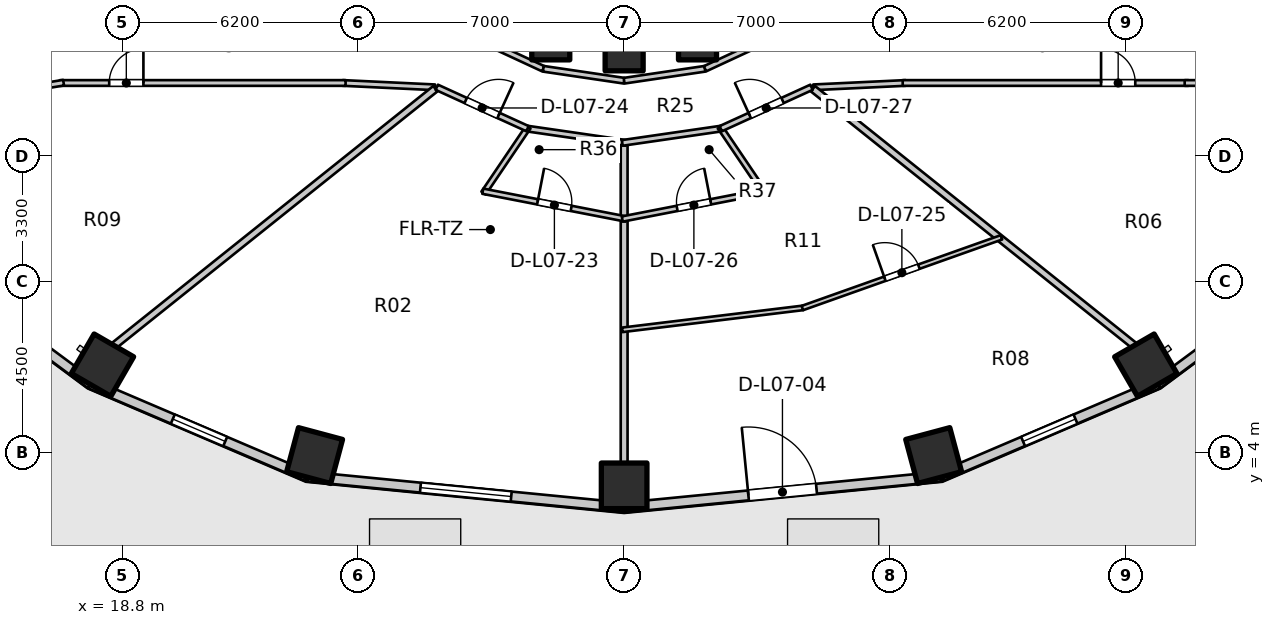
"""IFC4 building model, lengths in metres.
Left out: names, types, materials, properties, quantities, classifications, styles, units other than length and angle.
Written with IfcOpenShell. Run it as: python <this file> out.ifc"""

import sys

from ifc_helpers import new_model, si_unit, direction, frame, frame_2d, origin, origin_2d, place, context, subcontext, project, spatial, rectangle, extrude, element, fill, save


model = new_model("IFC4")
c1 = context("Model", 3, precision=1e-05, world=origin(), true_north=direction((0.0, 1.0)))
c2 = subcontext(c1, "Body", "Model", "MODEL_VIEW")
j1 = project(units=[si_unit("LENGTHUNIT", "METRE"), si_unit("PLANEANGLEUNIT", "RADIAN")], contexts=[c1])
p1 = place(None, origin())
s1 = spatial("IfcSite", under=j1, at=p1, CompositionType="ELEMENT")
p2 = place(p1, origin())
s2 = spatial("IfcBuilding", under=s1, at=p2, CompositionType="ELEMENT")
p3 = place(p2, frame((0.0, 0.0, 27.6)))
s3 = spatial("IfcBuildingStorey", under=s2, at=p3, CompositionType="ELEMENT", Elevation=27.6)
p4 = place(p3, frame((18.273, 6.296, 0.0), z_axis=(0.0, 0.0, 1.0), x_axis=(-0.5, -0.866025403784, 0.0)))
e1 = element("IfcColumn", 1, at=p4, inside=s3, PredefinedType="COLUMN", context=c2, shape_type="SweptSolid", body=[
    extrude(rectangle(XDim=1.2, YDim=1.2, at=origin_2d()), origin(), (0.0, 0.0, 1.0), 3.1),
])
p5 = place(p3, frame((30.069, 14.828, 0.0), z_axis=(0.0, 0.0, 1.0), x_axis=(1.0, 0.0, 0.0)))
e2 = element("IfcColumn", 2, at=p5, inside=s3, PredefinedType="COLUMN", context=c2, shape_type="SweptSolid", body=[
    extrude(rectangle(XDim=1.0, YDim=1.0, at=origin_2d()), origin(), (0.0, 0.0, 1.0), 3.1),
])
p6 = place(p3, frame((23.855, 3.916, 0.0), z_axis=(0.0, 0.0, 1.0), x_axis=(-0.258819045103, -0.965925826289, 0.0)))
e3 = element("IfcColumn", 3, at=p6, inside=s3, PredefinedType="COLUMN", context=c2, shape_type="SweptSolid", body=[
    extrude(rectangle(XDim=1.2, YDim=1.2, at=origin_2d()), origin(), (0.0, 0.0, 1.0), 3.1),
])
p7 = place(p3, frame((32.0, 14.54, 0.0), z_axis=(0.0, 0.0, 1.0), x_axis=(1.0, 0.0, 0.0)))
e4 = element("IfcColumn", 4, at=p7, inside=s3, PredefinedType="COLUMN", context=c2, shape_type="SweptSolid", body=[
    extrude(rectangle(XDim=1.0, YDim=1.0, at=origin_2d()), origin(), (0.0, 0.0, 1.0), 3.1),
])
p8 = place(p3, frame((32.0, 3.12, 0.0), z_axis=(0.0, 0.0, 1.0), x_axis=(0.0, -1.0, 0.0)))
e5 = element("IfcColumn", 5, at=p8, inside=s3, PredefinedType="COLUMN", context=c2, shape_type="SweptSolid", body=[
    extrude(rectangle(XDim=1.2, YDim=1.2, at=origin_2d()), origin(), (0.0, 0.0, 1.0), 3.1),
])
p9 = place(p3, frame((33.931, 14.828, 0.0), z_axis=(0.0, 0.0, 1.0), x_axis=(1.0, 0.0, 0.0)))
e6 = element("IfcColumn", 6, at=p9, inside=s3, PredefinedType="COLUMN", context=c2, shape_type="SweptSolid", body=[
    extrude(rectangle(XDim=1.0, YDim=1.0, at=origin_2d()), origin(), (0.0, 0.0, 1.0), 3.1),
])
for number, where, z_axis, x_axis in (
    (7, (40.145, 3.916, 0.0), (0.0, 0.0, 1.0), (0.259, -0.966, 0.0)),
    (8, (45.727, 6.296, 0.0), (0.0, 0.0, 1.0), (0.5, -0.866, 0.0)),
):
    element("IfcColumn", number, at=place(p3, frame(where, z_axis=z_axis, x_axis=x_axis)), inside=s3, PredefinedType="COLUMN", context=c2, shape_type="SweptSolid", body=[
        extrude(rectangle(XDim=1.2, YDim=1.2, at=origin_2d()), origin(), (0.0, 0.0, 1.0), 3.1),
    ])
p10 = place(p3, frame((13.595, 9.035, 0.0), z_axis=(0.0, 0.0, 1.0), x_axis=(0.803477531792, -0.595335078679, 0.0)))
e9 = element("IfcWall", 9, at=p10, inside=s3, PredefinedType="STANDARD", context=c2, shape_type="SweptSolid", body=[
    extrude(rectangle(XDim=5.43, YDim=0.26, at=frame_2d((2.715, 0.0))), origin(), (0.0, 0.0, 1.0), 2.85),
])
p11 = place(p3, frame((17.958, 5.803, 0.0), z_axis=(0.0, 0.0, 1.0), x_axis=(0.919612132394, -0.39282760335, 0.0)))
e10 = element("IfcWall", 10, at=p11, inside=s3, PredefinedType="STANDARD", context=c2, shape_type="SweptSolid", body=[
    extrude(rectangle(XDim=6.209, YDim=0.26, at=frame_2d((3.105, 0.0))), origin(), (0.0, 0.0, 1.0), 2.85),
])
p12 = place(p11, frame((2.355, 0.0, 0.75)))
e11 = element("IfcOpeningElement", 11, at=p12, cuts=e10, PredefinedType="OPENING", context=c2, shape_type="SweptSolid", body=[
    extrude(rectangle(XDim=1.5, YDim=1.6, at=frame_2d((0.75, 0.8))), frame((0.0, 0.14, 0.0), z_axis=(0.0, -1.0, 0.0), x_axis=(1.0, 0.0, 0.0)), (0.0, 0.0, 1.0), 0.28),
])
p13 = place(p3, frame((23.668, 3.364, 0.0), z_axis=(0.0, 0.0, 1.0), x_axis=(0.995247718352, -0.097375454379, 0.0)))
e12 = element("IfcWall", 12, at=p13, inside=s3, PredefinedType="STANDARD", context=c2, shape_type="SweptSolid", body=[
    extrude(rectangle(XDim=8.372, YDim=0.26, at=frame_2d((4.186, 0.0))), origin(), (0.0, 0.0, 1.0), 2.85),
])
p14 = place(p13, frame((2.986, 0.0, 0.75)))
e13 = element("IfcOpeningElement", 13, at=p14, cuts=e12, PredefinedType="OPENING", context=c2, shape_type="SweptSolid", body=[
    extrude(rectangle(XDim=2.4, YDim=1.7, at=frame_2d((1.2, 0.85))), frame((0.0, 0.14, 0.0), z_axis=(0.0, -1.0, 0.0), x_axis=(1.0, 0.0, 0.0)), (0.0, 0.0, 1.0), 0.28),
])
p15 = place(p3, frame((32.0, 2.549, 0.0), z_axis=(0.0, 0.0, 1.0), x_axis=(0.995247718352, 0.097375454379, 0.0)))
e14 = element("IfcWall", 14, at=p15, inside=s3, PredefinedType="STANDARD", context=c2, shape_type="SweptSolid", body=[
    extrude(rectangle(XDim=8.372, YDim=0.26, at=frame_2d((4.186, 0.0))), origin(), (0.0, 0.0, 1.0), 2.88),
])
p16 = place(p15, frame((3.286, 0.0, 0.0)))
e15 = element("IfcOpeningElement", 15, at=p16, cuts=e14, PredefinedType="OPENING", context=c2, shape_type="SweptSolid", body=[
    extrude(rectangle(XDim=1.8, YDim=2.35, at=frame_2d((0.9, 1.175))), frame((0.0, 0.14, 0.0), z_axis=(0.0, -1.0, 0.0), x_axis=(1.0, 0.0, 0.0)), (0.0, 0.0, 1.0), 0.28),
])
p17 = place(p3, frame((40.332, 3.364, 0.0), z_axis=(0.0, 0.0, 1.0), x_axis=(0.919612132394, 0.39282760335, 0.0)))
e16 = element("IfcWall", 16, at=p17, inside=s3, PredefinedType="STANDARD", context=c2, shape_type="SweptSolid", body=[
    extrude(rectangle(XDim=6.209, YDim=0.26, at=frame_2d((3.105, 0.0))), origin(), (0.0, 0.0, 1.0), 2.85),
])
p18 = place(p17, frame((2.355, 0.0, 0.75)))
e17 = element("IfcOpeningElement", 17, at=p18, cuts=e16, PredefinedType="OPENING", context=c2, shape_type="SweptSolid", body=[
    extrude(rectangle(XDim=1.5, YDim=1.6, at=frame_2d((0.75, 0.8))), frame((0.0, 0.14, 0.0), z_axis=(0.0, -1.0, 0.0), x_axis=(1.0, 0.0, 0.0)), (0.0, 0.0, 1.0), 0.28),
])
p19 = place(p3, frame((46.042, 5.803, 0.0), z_axis=(0.0, 0.0, 1.0), x_axis=(0.803477531792, 0.595335078679, 0.0)))
e18 = element("IfcWall", 18, at=p19, inside=s3, PredefinedType="STANDARD", context=c2, shape_type="SweptSolid", body=[
    extrude(rectangle(XDim=5.43, YDim=0.26, at=frame_2d((2.715, 0.0))), origin(), (0.0, 0.0, 1.0), 2.85),
])
p20 = place(p3, frame((27.89, 15.015, 0.0), z_axis=(0.0, 0.0, 1.0), x_axis=(0.906943449489, -0.421252393975, 0.0)))
e19 = element("IfcWall", 19, at=p20, inside=s3, PredefinedType="PARTITIONING", context=c2, shape_type="SweptSolid", body=[
    extrude(rectangle(XDim=2.186, YDim=0.15, at=frame_2d((1.093, 0.0))), origin(), (0.0, 0.0, 1.0), 2.237),
])
for number, where, z_axis, x_axis in (
    (20, (29.873, 14.094, 0.0), (0.0, 0.0, 1.0), (0.989, -0.146, 0.0)),
    (21, (32.0, 13.78, 0.0), (0.0, 0.0, 1.0), (0.989, 0.146, 0.0)),
):
    element("IfcWall", number, at=place(p3, frame(where, z_axis=z_axis, x_axis=x_axis)), inside=s3, PredefinedType="PARTITIONING", context=c2, shape_type="SweptSolid", body=[
        extrude(rectangle(XDim=2.151, YDim=0.15, at=frame_2d((1.075, 0.0))), origin(), (0.0, 0.0, 1.0), 2.237),
    ])
p21 = place(p3, frame((34.127, 14.094, 0.0), z_axis=(0.0, 0.0, 1.0), x_axis=(0.906943449489, 0.421252393975, 0.0)))
e22 = element("IfcWall", 22, at=p21, inside=s3, PredefinedType="PARTITIONING", context=c2, shape_type="SweptSolid", body=[
    extrude(rectangle(XDim=2.186, YDim=0.15, at=frame_2d((1.093, 0.0))), origin(), (0.0, 0.0, 1.0), 2.237),
])
p22 = place(p3, frame((27.02, 13.606, 0.0), z_axis=(0.0, 0.0, 1.0), x_axis=(-0.998877427952, 0.047369651964, 0.0)))
e23 = element("IfcWall", 23, at=p22, inside=s3, PredefinedType="PARTITIONING", context=c2, shape_type="SweptSolid", body=[
    extrude(rectangle(XDim=2.433, YDim=0.15, at=frame_2d((1.216, 0.0))), origin(), (0.0, 0.0, 1.0), 2.237),
])
p23 = place(p3, frame((17.15, 13.72, 0.0), z_axis=(0.0, 0.0, 1.0), x_axis=(1.0, 0.0, 0.0)))
e24 = element("IfcWall", 24, at=p23, inside=s3, PredefinedType="PARTITIONING", context=c2, shape_type="SweptSolid", body=[
    extrude(rectangle(XDim=7.52, YDim=0.15, at=frame_2d((3.76, 0.0))), origin(), (0.0, 0.0, 1.0), 2.237),
])
p24 = place(p23, frame((1.3, 0.0, 0.0)))
e25 = element("IfcOpeningElement", 25, at=p24, cuts=e24, PredefinedType="OPENING", context=c2, shape_type="SweptSolid", body=[
    extrude(rectangle(XDim=0.9, YDim=2.1, at=frame_2d((0.45, 1.05))), frame((0.0, 0.085, 0.0), z_axis=(0.0, -1.0, 0.0), x_axis=(1.0, 0.0, 0.0)), (0.0, 0.0, 1.0), 0.17),
])
p25 = place(p3, frame((17.249, 13.728, 0.0), z_axis=(0.0, 0.0, 1.0), x_axis=(-0.98693078372, -0.161144742846, 0.0)))
e26 = element("IfcWall", 26, at=p25, inside=s3, PredefinedType="PARTITIONING", context=c2, shape_type="SweptSolid", body=[
    extrude(rectangle(XDim=7.557, YDim=0.15, at=frame_2d((3.779, 0.0))), origin(), (0.0, 0.0, 1.0), 2.069),
])
p26 = place(p3, frame((36.98, 13.606, 0.0), z_axis=(0.0, 0.0, 1.0), x_axis=(0.998877427952, 0.047369651964, 0.0)))
e27 = element("IfcWall", 27, at=p26, inside=s3, PredefinedType="PARTITIONING", context=c2, shape_type="SweptSolid", body=[
    extrude(rectangle(XDim=2.433, YDim=0.15, at=frame_2d((1.216, 0.0))), origin(), (0.0, 0.0, 1.0), 2.237),
])
p27 = place(p3, frame((39.33, 13.72, 0.0), z_axis=(0.0, 0.0, 1.0), x_axis=(1.0, 0.0, 0.0)))
e28 = element("IfcWall", 28, at=p27, inside=s3, PredefinedType="PARTITIONING", context=c2, shape_type="SweptSolid", body=[
    extrude(rectangle(XDim=7.52, YDim=0.15, at=frame_2d((3.76, 0.0))), origin(), (0.0, 0.0, 1.0), 2.237),
])
p28 = place(p27, frame((5.22, 0.0, 0.0)))
e29 = element("IfcOpeningElement", 29, at=p28, cuts=e28, PredefinedType="OPENING", context=c2, shape_type="SweptSolid", body=[
    extrude(rectangle(XDim=0.9, YDim=2.1, at=frame_2d((0.45, 1.05))), frame((0.0, 0.085, 0.0), z_axis=(0.0, -1.0, 0.0), x_axis=(1.0, 0.0, 0.0)), (0.0, 0.0, 1.0), 0.17),
])
p29 = place(p3, frame((46.75, 13.72, 0.0), z_axis=(0.0, 0.0, 1.0), x_axis=(1.0, 0.0, 0.0)))
e30 = element("IfcWall", 30, at=p29, inside=s3, PredefinedType="PARTITIONING", context=c2, shape_type="SweptSolid", body=[
    extrude(rectangle(XDim=5.05, YDim=0.15, at=frame_2d((2.525, 0.0))), origin(), (0.0, 0.0, 1.0), 2.069),
])
p30 = place(p3, frame((27.032, 13.569, 0.0), z_axis=(0.0, 0.0, 1.0), x_axis=(-0.781055486744, -0.624461629428, 0.0)))
e31 = element("IfcWall", 31, at=p30, inside=s3, PredefinedType="PARTITIONING", context=c2, shape_type="SweptSolid", body=[
    extrude(rectangle(XDim=10.843, YDim=0.18, at=frame_2d((5.422, 0.0))), origin(), (0.0, 0.0, 1.0), 2.237),
])
p31 = place(p3, frame((32.0, 12.095, 0.0), z_axis=(0.0, 0.0, 1.0), x_axis=(0.0, -1.0, 0.0)))
e32 = element("IfcWall", 32, at=p31, inside=s3, PredefinedType="PARTITIONING", context=c2, shape_type="SweptSolid", body=[
    extrude(rectangle(XDim=8.395, YDim=0.18, at=frame_2d((4.198, 0.0))), origin(), (0.0, 0.0, 1.0), 2.237),
])
p32 = place(p3, frame((36.968, 13.569, 0.0), z_axis=(0.0, 0.0, 1.0), x_axis=(0.781055486744, -0.624461629428, 0.0)))
e33 = element("IfcWall", 33, at=p32, inside=s3, PredefinedType="PARTITIONING", context=c2, shape_type="SweptSolid", body=[
    extrude(rectangle(XDim=10.843, YDim=0.18, at=frame_2d((5.422, 0.0))), origin(), (0.0, 0.0, 1.0), 2.237),
])
p33 = place(p3, frame((29.401, 12.527, 0.0), z_axis=(0.0, 0.0, 1.0), x_axis=(0.989649898776, -0.143502884474, 0.0)))
e34 = element("IfcWall", 34, at=p33, inside=s3, PredefinedType="PARTITIONING", context=c2, shape_type="SweptSolid", body=[
    extrude(rectangle(XDim=2.676, YDim=0.15, at=frame_2d((1.338, 0.0))), origin(), (0.0, 0.0, 1.0), 2.237),
])
p34 = place(p3, frame((29.479, 12.561, 0.0), z_axis=(0.0, 0.0, 1.0), x_axis=(-0.56056273171, -0.828111963335, 0.0)))
e35 = element("IfcWall", 35, at=p34, inside=s3, PredefinedType="PLUMBINGWALL", context=c2, shape_type="SweptSolid", body=[
    extrude(rectangle(XDim=2.1, YDim=0.14, at=frame_2d((1.05, 0.0))), origin(), (0.0, 0.0, 1.0), 2.855),
])
p35 = place(p3, frame((28.28, 10.873, 0.0), z_axis=(0.0, 0.0, 1.0), x_axis=(0.981623000654, -0.190830512727, 0.0)))
e36 = element("IfcWall", 36, at=p35, inside=s3, PredefinedType="PLUMBINGWALL", context=c2, shape_type="SweptSolid", body=[
    extrude(rectangle(XDim=3.839, YDim=0.14, at=frame_2d((1.92, 0.0))), origin(), (0.0, 0.0, 1.0), 2.237),
])
p36 = place(p35, frame((1.47, 0.0, 0.0)))
e37 = element("IfcOpeningElement", 37, at=p36, cuts=e36, PredefinedType="OPENING", context=c2, shape_type="SweptSolid", body=[
    extrude(rectangle(XDim=0.9, YDim=2.1, at=frame_2d((0.45, 1.05))), frame((0.0, 0.08, 0.0), z_axis=(0.0, -1.0, 0.0), x_axis=(1.0, 0.0, 0.0)), (0.0, 0.0, 1.0), 0.16),
])
p37 = place(p3, frame((27.069, 13.607, 0.0), z_axis=(0.0, 0.0, 1.0), x_axis=(0.909747571199, -0.415161843982, 0.0)))
e38 = element("IfcWall", 38, at=p37, inside=s3, PredefinedType="PARTITIONING", context=c2, shape_type="SweptSolid", body=[
    extrude(rectangle(XDim=2.625, YDim=0.15, at=frame_2d((1.312, 0.0))), origin(), (0.0, 0.0, 1.0), 2.237),
])
p38 = place(p37, frame((0.838, 0.0, 0.0)))
e39 = element("IfcOpeningElement", 39, at=p38, cuts=e38, PredefinedType="OPENING", context=c2, shape_type="SweptSolid", body=[
    extrude(rectangle(XDim=0.95, YDim=2.1, at=frame_2d((0.475, 1.05))), frame((0.0, 0.085, 0.0), z_axis=(0.0, -1.0, 0.0), x_axis=(1.0, 0.0, 0.0)), (0.0, 0.0, 1.0), 0.17),
])
p39 = place(p3, frame((31.95, 7.225, 0.0), z_axis=(0.0, 0.0, 1.0), x_axis=(0.992699076447, 0.120617343785, 0.0)))
e40 = element("IfcWall", 40, at=p39, inside=s3, PredefinedType="MOVABLE", context=c2, shape_type="SweptSolid", body=[
    extrude(rectangle(XDim=4.793, YDim=0.12, at=frame_2d((2.396, 0.0))), origin(), (0.0, 0.0, 1.0), 2.237),
])
p40 = place(p3, frame((36.689, 7.798, 0.0), z_axis=(0.0, 0.0, 1.0), x_axis=(0.942369240096, 0.334574678243, 0.0)))
e41 = element("IfcWall", 41, at=p40, inside=s3, PredefinedType="MOVABLE", context=c2, shape_type="SweptSolid", body=[
    extrude(rectangle(XDim=5.559, YDim=0.12, at=frame_2d((2.779, 0.0))), origin(), (0.0, 0.0, 1.0), 2.237),
])
p41 = place(p40, frame((2.304, 0.0, 0.0)))
e42 = element("IfcOpeningElement", 42, at=p41, cuts=e41, PredefinedType="OPENING", context=c2, shape_type="SweptSolid", body=[
    extrude(rectangle(XDim=0.95, YDim=2.1, at=frame_2d((0.475, 1.05))), frame((0.0, 0.07, 0.0), z_axis=(0.0, -1.0, 0.0), x_axis=(1.0, 0.0, 0.0)), (0.0, 0.0, 1.0), 0.14),
])
p42 = place(p3, frame((31.95, 12.143, 0.0), z_axis=(0.0, 0.0, 1.0), x_axis=(0.989649898776, 0.143502884474, 0.0)))
e43 = element("IfcWall", 43, at=p42, inside=s3, PredefinedType="PARTITIONING", context=c2, shape_type="SweptSolid", body=[
    extrude(rectangle(XDim=2.676, YDim=0.15, at=frame_2d((1.338, 0.0))), origin(), (0.0, 0.0, 1.0), 2.237),
])
p43 = place(p3, frame((34.521, 12.561, 0.0), z_axis=(0.0, 0.0, 1.0), x_axis=(0.56056273171, -0.828111963335, 0.0)))
e44 = element("IfcWall", 44, at=p43, inside=s3, PredefinedType="PLUMBINGWALL", context=c2, shape_type="SweptSolid", body=[
    extrude(rectangle(XDim=2.1, YDim=0.14, at=frame_2d((1.05, 0.0))), origin(), (0.0, 0.0, 1.0), 2.855),
])
p44 = place(p3, frame((31.951, 10.14, 0.0), z_axis=(0.0, 0.0, 1.0), x_axis=(0.981623000654, 0.190830512727, 0.0)))
e45 = element("IfcWall", 45, at=p44, inside=s3, PredefinedType="PLUMBINGWALL", context=c2, shape_type="SweptSolid", body=[
    extrude(rectangle(XDim=3.839, YDim=0.14, at=frame_2d((1.92, 0.0))), origin(), (0.0, 0.0, 1.0), 2.237),
])
p45 = place(p44, frame((1.47, 0.0, 0.0)))
e46 = element("IfcOpeningElement", 46, at=p45, cuts=e45, PredefinedType="OPENING", context=c2, shape_type="SweptSolid", body=[
    extrude(rectangle(XDim=0.9, YDim=2.1, at=frame_2d((0.45, 1.05))), frame((0.0, 0.08, 0.0), z_axis=(0.0, -1.0, 0.0), x_axis=(1.0, 0.0, 0.0)), (0.0, 0.0, 1.0), 0.16),
])
p46 = place(p3, frame((34.543, 12.518, 0.0), z_axis=(0.0, 0.0, 1.0), x_axis=(0.909747571199, 0.415161843982, 0.0)))
e47 = element("IfcWall", 47, at=p46, inside=s3, PredefinedType="PARTITIONING", context=c2, shape_type="SweptSolid", body=[
    extrude(rectangle(XDim=2.625, YDim=0.15, at=frame_2d((1.312, 0.0))), origin(), (0.0, 0.0, 1.0), 2.237),
])
p47 = place(p46, frame((0.838, 0.0, 0.0)))
e48 = element("IfcOpeningElement", 48, at=p47, cuts=e47, PredefinedType="OPENING", context=c2, shape_type="SweptSolid", body=[
    extrude(rectangle(XDim=0.95, YDim=2.1, at=frame_2d((0.475, 1.05))), frame((0.0, 0.085, 0.0), z_axis=(0.0, -1.0, 0.0), x_axis=(1.0, 0.0, 0.0)), (0.0, 0.0, 1.0), 0.17),
])
p48 = place(p12, origin())
e49 = element("IfcWindow", 49, at=p48, inside=s3, PartitioningType="SINGLE_PANEL", PredefinedType="WINDOW", context=c2, shape_type="SweptSolid", body=[
    extrude(rectangle(XDim=1.5, YDim=1.6, at=frame_2d((0.75, 0.8))), frame((0.0, 0.03, 0.0), z_axis=(0.0, -1.0, 0.0), x_axis=(1.0, 0.0, 0.0)), (0.0, 0.0, 1.0), 0.06),
])
fill(e11, e49)
p49 = place(p14, origin())
e50 = element("IfcWindow", 50, at=p49, inside=s3, PartitioningType="SINGLE_PANEL", PredefinedType="WINDOW", context=c2, shape_type="SweptSolid", body=[
    extrude(rectangle(XDim=2.4, YDim=1.7, at=frame_2d((1.2, 0.85))), frame((0.0, 0.03, 0.0), z_axis=(0.0, -1.0, 0.0), x_axis=(1.0, 0.0, 0.0)), (0.0, 0.0, 1.0), 0.06),
])
fill(e13, e50)
p50 = place(p16, origin())
e51 = element("IfcDoor", 51, at=p50, inside=s3, OperationType="SINGLE_SWING_LEFT", PredefinedType="DOOR", context=c2, shape_type="SweptSolid", body=[
    extrude(rectangle(XDim=1.8, YDim=2.35, at=frame_2d((0.9, 1.175))), frame((0.0, 0.025, 0.0), z_axis=(0.0, -1.0, 0.0), x_axis=(1.0, 0.0, 0.0)), (0.0, 0.0, 1.0), 0.05),
])
fill(e15, e51)
p51 = place(p18, origin())
e52 = element("IfcWindow", 52, at=p51, inside=s3, PartitioningType="SINGLE_PANEL", PredefinedType="WINDOW", context=c2, shape_type="SweptSolid", body=[
    extrude(rectangle(XDim=1.5, YDim=1.6, at=frame_2d((0.75, 0.8))), frame((0.0, 0.03, 0.0), z_axis=(0.0, -1.0, 0.0), x_axis=(1.0, 0.0, 0.0)), (0.0, 0.0, 1.0), 0.06),
])
fill(e17, e52)
p52 = place(p24, origin())
e53 = element("IfcDoor", 53, at=p52, inside=s3, OperationType="SINGLE_SWING_RIGHT", PredefinedType="DOOR", context=c2, shape_type="SweptSolid", body=[
    extrude(rectangle(XDim=0.9, YDim=2.1, at=frame_2d((0.45, 1.05))), frame((0.0, 0.025, 0.0), z_axis=(0.0, -1.0, 0.0), x_axis=(1.0, 0.0, 0.0)), (0.0, 0.0, 1.0), 0.05),
])
fill(e25, e53)
p53 = place(p28, origin())
e54 = element("IfcDoor", 54, at=p53, inside=s3, OperationType="SINGLE_SWING_LEFT", PredefinedType="DOOR", context=c2, shape_type="SweptSolid", body=[
    extrude(rectangle(XDim=0.9, YDim=2.1, at=frame_2d((0.45, 1.05))), frame((0.0, 0.025, 0.0), z_axis=(0.0, -1.0, 0.0), x_axis=(1.0, 0.0, 0.0)), (0.0, 0.0, 1.0), 0.05),
])
fill(e29, e54)
p54 = place(p36, origin())
e55 = element("IfcDoor", 55, at=p54, inside=s3, OperationType="SINGLE_SWING_LEFT", PredefinedType="DOOR", context=c2, shape_type="SweptSolid", body=[
    extrude(rectangle(XDim=0.9, YDim=2.1, at=frame_2d((0.45, 1.05))), frame((0.0, 0.025, 0.0), z_axis=(0.0, -1.0, 0.0), x_axis=(1.0, 0.0, 0.0)), (0.0, 0.0, 1.0), 0.05),
])
fill(e37, e55)
p55 = place(p38, origin())
e56 = element("IfcDoor", 56, at=p55, inside=s3, OperationType="SINGLE_SWING_RIGHT", PredefinedType="DOOR", context=c2, shape_type="SweptSolid", body=[
    extrude(rectangle(XDim=0.95, YDim=2.1, at=frame_2d((0.475, 1.05))), frame((0.0, 0.025, 0.0), z_axis=(0.0, -1.0, 0.0), x_axis=(1.0, 0.0, 0.0)), (0.0, 0.0, 1.0), 0.05),
])
fill(e39, e56)
p56 = place(p41, origin())
e57 = element("IfcDoor", 57, at=p56, inside=s3, OperationType="SINGLE_SWING_LEFT", PredefinedType="DOOR", context=c2, shape_type="SweptSolid", body=[
    extrude(rectangle(XDim=0.95, YDim=2.1, at=frame_2d((0.475, 1.05))), frame((0.0, 0.025, 0.0), z_axis=(0.0, -1.0, 0.0), x_axis=(1.0, 0.0, 0.0)), (0.0, 0.0, 1.0), 0.05),
])
fill(e42, e57)
p57 = place(p45, origin())
e58 = element("IfcDoor", 58, at=p57, inside=s3, OperationType="SINGLE_SWING_RIGHT", PredefinedType="DOOR", context=c2, shape_type="SweptSolid", body=[
    extrude(rectangle(XDim=0.9, YDim=2.1, at=frame_2d((0.45, 1.05))), frame((0.0, 0.025, 0.0), z_axis=(0.0, -1.0, 0.0), x_axis=(1.0, 0.0, 0.0)), (0.0, 0.0, 1.0), 0.05),
])
fill(e46, e58)
p58 = place(p47, origin())
e59 = element("IfcDoor", 59, at=p58, inside=s3, OperationType="SINGLE_SWING_LEFT", PredefinedType="DOOR", context=c2, shape_type="SweptSolid", body=[
    extrude(rectangle(XDim=0.95, YDim=2.1, at=frame_2d((0.475, 1.05))), frame((0.0, 0.025, 0.0), z_axis=(0.0, -1.0, 0.0), x_axis=(1.0, 0.0, 0.0)), (0.0, 0.0, 1.0), 0.05),
])
fill(e48, e59)
save(model, sys.argv[1])
